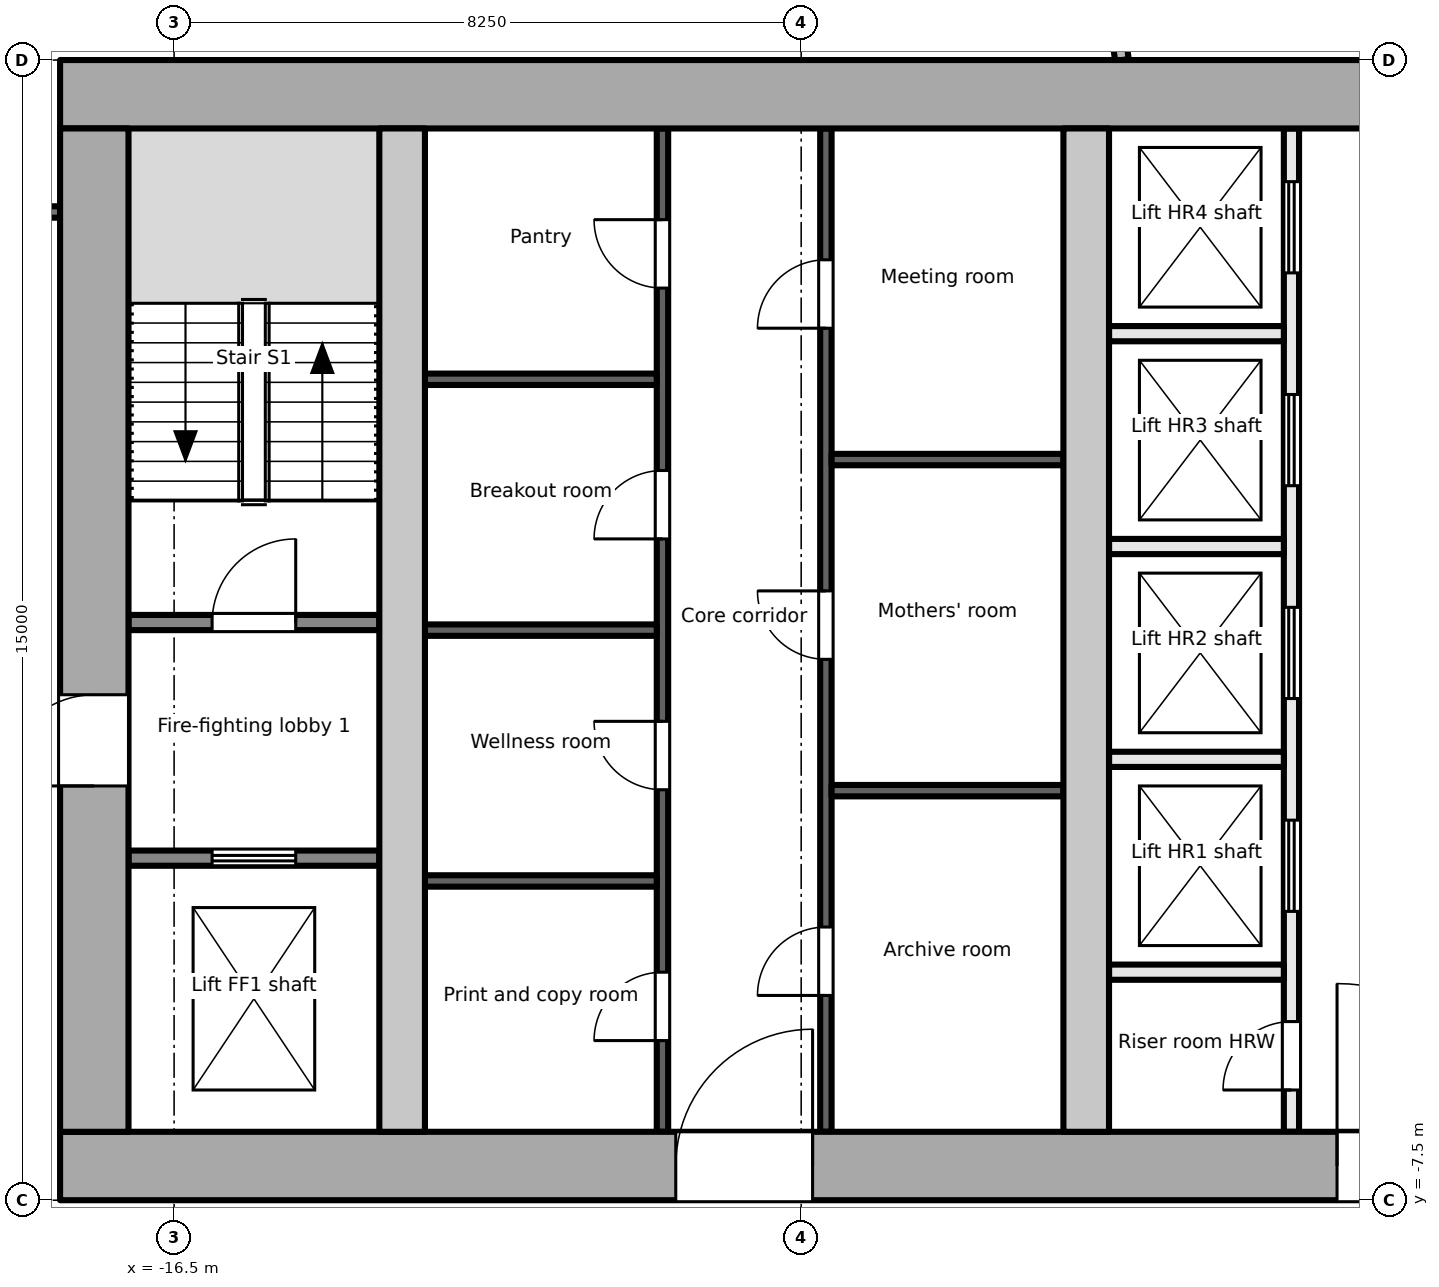
"""IFC4 building model, lengths in metres.
Left out: names, types, materials, properties, quantities, classifications, styles, units other than length and angle.
Written with IfcOpenShell. Run it as: python <this file> out.ifc"""

import sys

from ifc_helpers import new_model, si_unit, direction, frame, frame_2d, origin, place, context, subcontext, project, spatial, rectangle, extrude, element, fill, save


model = new_model("IFC4")
c1 = context("Model", 3, precision=1e-05, world=origin(), true_north=direction((0.0, 1.0)))
c2 = subcontext(c1, "Body", "Model", "MODEL_VIEW")
j1 = project(units=[si_unit("LENGTHUNIT", "METRE"), si_unit("PLANEANGLEUNIT", "RADIAN")], contexts=[c1])
p1 = place(None, origin())
s1 = spatial("IfcSite", under=j1, at=p1, CompositionType="ELEMENT")
p2 = place(p1, origin())
s2 = spatial("IfcBuilding", under=s1, at=p2, CompositionType="ELEMENT")
p3 = place(p2, frame((0.0, 0.0, 176.3)))
s3 = spatial("IfcBuildingStorey", under=s2, at=p3, CompositionType="ELEMENT", Elevation=176.3)
p4 = place(p3, frame((-18.0, -7.05, -0.2), z_axis=(0.0, 0.0, 1.0), x_axis=(1.0, 0.0, 0.0)))
e1 = element("IfcWall", 1, at=p4, inside=s3, PredefinedType="SHEAR", context=c2, shape_type="SweptSolid", body=[
    extrude(rectangle(XDim=36.0, YDim=0.9, at=frame_2d((18.0, 0.0))), origin(), (0.0, 0.0, 1.0), 3.9),
])
p5 = place(p4, frame((8.1, 0.0, 0.2)))
e2 = element("IfcOpeningElement", 2, at=p5, cuts=e1, PredefinedType="OPENING", context=c2, shape_type="SweptSolid", body=[
    extrude(rectangle(XDim=1.8, YDim=2.1, at=frame_2d((0.9, 1.05))), frame((0.0, 0.46, 0.0), z_axis=(0.0, -1.0, 0.0), x_axis=(1.0, 0.0, 0.0)), (0.0, 0.0, 1.0), 0.921),
])
p6 = place(p4, frame((16.8, 0.0, 0.2)))
e3 = element("IfcOpeningElement", 3, at=p6, cuts=e1, PredefinedType="OPENING", context=c2, shape_type="SweptSolid", body=[
    extrude(rectangle(XDim=2.4, YDim=2.1, at=frame_2d((1.2, 1.05))), frame((0.0, 0.46, 0.0), z_axis=(0.0, -1.0, 0.0), x_axis=(1.0, 0.0, 0.0)), (0.0, 0.0, 1.0), 0.921),
])
p7 = place(p4, frame((26.1, 0.0, 0.2)))
e4 = element("IfcOpeningElement", 4, at=p7, cuts=e1, PredefinedType="OPENING", context=c2, shape_type="SweptSolid", body=[
    extrude(rectangle(XDim=2.4, YDim=2.1, at=frame_2d((1.2, 1.05))), frame((0.0, 0.46, 0.0), z_axis=(0.0, -1.0, 0.0), x_axis=(1.0, 0.0, 0.0)), (0.0, 0.0, 1.0), 0.921),
])
p8 = place(p3, frame((-18.0, 7.05, -0.2), z_axis=(0.0, 0.0, 1.0), x_axis=(1.0, 0.0, 0.0)))
e5 = element("IfcWall", 5, at=p8, inside=s3, PredefinedType="SHEAR", context=c2, shape_type="SweptSolid", body=[
    extrude(rectangle(XDim=36.0, YDim=0.9, at=frame_2d((18.0, 0.0))), origin(), (0.0, 0.0, 1.0), 3.9),
])
p9 = place(p3, frame((-17.55, -6.6, -0.2), z_axis=(0.0, 0.0, 1.0), x_axis=(0.0, 1.0, 0.0)))
e6 = element("IfcWall", 6, at=p9, inside=s3, PredefinedType="SHEAR", context=c2, shape_type="SweptSolid", body=[
    extrude(rectangle(XDim=13.2, YDim=0.9, at=frame_2d((6.6, 0.0))), origin(), (0.0, 0.0, 1.0), 3.9),
])
p10 = place(p9, frame((4.55, 0.0, 0.2)))
e7 = element("IfcOpeningElement", 7, at=p10, cuts=e6, PredefinedType="OPENING", context=c2, shape_type="SweptSolid", body=[
    extrude(rectangle(XDim=1.2, YDim=2.1, at=frame_2d((0.6, 1.05))), frame((0.0, 0.46, 0.0), z_axis=(0.0, -1.0, 0.0), x_axis=(1.0, 0.0, 0.0)), (0.0, 0.0, 1.0), 0.921),
])
for number, where, z_axis, x_axis in (
    (8, (-13.5, -6.6, -0.2), (0.0, 0.0, 1.0), (0.0, 1.0, 0.0)),
    (9, (-4.5, -6.6, -0.2), (0.0, 0.0, 1.0), (0.0, 1.0, 0.0)),
):
    element("IfcWall", number, at=place(p3, frame(where, z_axis=z_axis, x_axis=x_axis)), inside=s3, PredefinedType="SHEAR", context=c2, shape_type="SweptSolid", body=[
        extrude(rectangle(XDim=13.2, YDim=0.6, at=frame_2d((6.6, 0.0))), origin(), (0.0, 0.0, 1.0), 3.9),
    ])
p11 = place(p3, frame((-17.1, -3.0, 0.0), z_axis=(0.0, 0.0, 1.0), x_axis=(1.0, 0.0, 0.0)))
e10 = element("IfcWall", 10, at=p11, inside=s3, PredefinedType="PARTITIONING", context=c2, shape_type="SweptSolid", body=[
    extrude(rectangle(XDim=3.3, YDim=0.2, at=frame_2d((1.65, 0.0))), origin(), (0.0, 0.0, 1.0), 3.7),
])
p12 = place(p11, frame((1.1, 0.0, 0.0)))
e11 = element("IfcOpeningElement", 11, at=p12, cuts=e10, PredefinedType="OPENING", context=c2, shape_type="SweptSolid", body=[
    extrude(rectangle(XDim=1.1, YDim=2.1, at=frame_2d((0.55, 1.05))), frame((0.0, 0.111, 0.0), z_axis=(0.0, -1.0, 0.0), x_axis=(1.0, 0.0, 0.0)), (0.0, 0.0, 1.0), 0.221),
])
p13 = place(p3, frame((-17.1, 0.1, 0.0), z_axis=(0.0, 0.0, 1.0), x_axis=(1.0, 0.0, 0.0)))
e12 = element("IfcWall", 12, at=p13, inside=s3, PredefinedType="PARTITIONING", context=c2, shape_type="SweptSolid", body=[
    extrude(rectangle(XDim=3.3, YDim=0.2, at=frame_2d((1.65, 0.0))), origin(), (0.0, 0.0, 1.0), 3.7),
])
p14 = place(p13, frame((1.1, 0.0, 0.0)))
e13 = element("IfcOpeningElement", 13, at=p14, cuts=e12, PredefinedType="OPENING", context=c2, shape_type="SweptSolid", body=[
    extrude(rectangle(XDim=1.1, YDim=2.1, at=frame_2d((0.55, 1.05))), frame((0.0, 0.111, 0.0), z_axis=(0.0, -1.0, 0.0), x_axis=(1.0, 0.0, 0.0)), (0.0, 0.0, 1.0), 0.221),
])
p15 = place(p3, frame((-10.075, -6.6, 0.0), z_axis=(0.0, 0.0, 1.0), x_axis=(0.0, 1.0, 0.0)))
e14 = element("IfcWall", 14, at=p15, inside=s3, PredefinedType="PARTITIONING", context=c2, shape_type="SweptSolid", body=[
    extrude(rectangle(XDim=13.2, YDim=0.15, at=frame_2d((6.6, 0.0))), origin(), (0.0, 0.0, 1.0), 3.7),
])
p16 = place(p15, frame((1.2, 0.0, 0.0)))
e15 = element("IfcOpeningElement", 15, at=p16, cuts=e14, PredefinedType="OPENING", context=c2, shape_type="SweptSolid", body=[
    extrude(rectangle(XDim=0.9, YDim=2.1, at=frame_2d((0.45, 1.05))), frame((0.0, 0.085, 0.0), z_axis=(0.0, -1.0, 0.0), x_axis=(1.0, 0.0, 0.0)), (0.0, 0.0, 1.0), 0.171),
])
p17 = place(p15, frame((4.5, 0.0, 0.0)))
e16 = element("IfcOpeningElement", 16, at=p17, cuts=e14, PredefinedType="OPENING", context=c2, shape_type="SweptSolid", body=[
    extrude(rectangle(XDim=0.9, YDim=2.1, at=frame_2d((0.45, 1.05))), frame((0.0, 0.085, 0.0), z_axis=(0.0, -1.0, 0.0), x_axis=(1.0, 0.0, 0.0)), (0.0, 0.0, 1.0), 0.171),
])
p18 = place(p15, frame((7.8, 0.0, 0.0)))
e17 = element("IfcOpeningElement", 17, at=p18, cuts=e14, PredefinedType="OPENING", context=c2, shape_type="SweptSolid", body=[
    extrude(rectangle(XDim=0.9, YDim=2.1, at=frame_2d((0.45, 1.05))), frame((0.0, 0.085, 0.0), z_axis=(0.0, -1.0, 0.0), x_axis=(1.0, 0.0, 0.0)), (0.0, 0.0, 1.0), 0.171),
])
p19 = place(p15, frame((11.1, 0.0, 0.0)))
e18 = element("IfcOpeningElement", 18, at=p19, cuts=e14, PredefinedType="OPENING", context=c2, shape_type="SweptSolid", body=[
    extrude(rectangle(XDim=0.9, YDim=2.1, at=frame_2d((0.45, 1.05))), frame((0.0, 0.085, 0.0), z_axis=(0.0, -1.0, 0.0), x_axis=(1.0, 0.0, 0.0)), (0.0, 0.0, 1.0), 0.171),
])
for number, where, z_axis, x_axis in (
    (19, (-13.2, -3.3, 0.0), (0.0, 0.0, 1.0), (1.0, 0.0, 0.0)),
    (20, (-13.2, 0.0, 0.0), (0.0, 0.0, 1.0), (1.0, 0.0, 0.0)),
    (21, (-13.2, 3.3, 0.0), (0.0, 0.0, 1.0), (1.0, 0.0, 0.0)),
):
    element("IfcWall", number, at=place(p3, frame(where, z_axis=z_axis, x_axis=x_axis)), inside=s3, PredefinedType="PARTITIONING", context=c2, shape_type="SweptSolid", body=[
        extrude(rectangle(XDim=3.05, YDim=0.15, at=frame_2d((1.525, 0.0))), origin(), (0.0, 0.0, 1.0), 3.7),
    ])
p20 = place(p3, frame((-7.925, -6.6, 0.0), z_axis=(0.0, 0.0, 1.0), x_axis=(0.0, 1.0, 0.0)))
e22 = element("IfcWall", 22, at=p20, inside=s3, PredefinedType="PARTITIONING", context=c2, shape_type="SweptSolid", body=[
    extrude(rectangle(XDim=13.2, YDim=0.15, at=frame_2d((6.6, 0.0))), origin(), (0.0, 0.0, 1.0), 3.7),
])
p21 = place(p20, frame((1.794, 0.0, 0.0)))
e23 = element("IfcOpeningElement", 23, at=p21, cuts=e22, PredefinedType="OPENING", context=c2, shape_type="SweptSolid", body=[
    extrude(rectangle(XDim=0.9, YDim=2.1, at=frame_2d((0.45, 1.05))), frame((0.0, 0.085, 0.0), z_axis=(0.0, -1.0, 0.0), x_axis=(1.0, 0.0, 0.0)), (0.0, 0.0, 1.0), 0.171),
])
p22 = place(p20, frame((6.216, 0.0, 0.0)))
e24 = element("IfcOpeningElement", 24, at=p22, cuts=e22, PredefinedType="OPENING", context=c2, shape_type="SweptSolid", body=[
    extrude(rectangle(XDim=0.9, YDim=2.1, at=frame_2d((0.45, 1.05))), frame((0.0, 0.085, 0.0), z_axis=(0.0, -1.0, 0.0), x_axis=(1.0, 0.0, 0.0)), (0.0, 0.0, 1.0), 0.171),
])
p23 = place(p20, frame((10.572, 0.0, 0.0)))
e25 = element("IfcOpeningElement", 25, at=p23, cuts=e22, PredefinedType="OPENING", context=c2, shape_type="SweptSolid", body=[
    extrude(rectangle(XDim=0.9, YDim=2.1, at=frame_2d((0.45, 1.05))), frame((0.0, 0.085, 0.0), z_axis=(0.0, -1.0, 0.0), x_axis=(1.0, 0.0, 0.0)), (0.0, 0.0, 1.0), 0.171),
])
for number, where, z_axis, x_axis in (
    (26, (-7.85, -2.112, 0.0), (0.0, 0.0, 1.0), (1.0, 0.0, 0.0)),
    (27, (-7.85, 2.244, 0.0), (0.0, 0.0, 1.0), (1.0, 0.0, 0.0)),
):
    element("IfcWall", number, at=place(p3, frame(where, z_axis=z_axis, x_axis=x_axis)), inside=s3, PredefinedType="PARTITIONING", context=c2, shape_type="SweptSolid", body=[
        extrude(rectangle(XDim=3.05, YDim=0.15, at=frame_2d((1.525, 0.0))), origin(), (0.0, 0.0, 1.0), 3.7),
    ])
p24 = place(p3, frame((-1.8, -6.6, 0.0), z_axis=(0.0, 0.0, 1.0), x_axis=(0.0, 1.0, 0.0)))
e28 = element("IfcWall", 28, at=p24, inside=s3, PredefinedType="PARTITIONING", context=c2, shape_type="SweptSolid", body=[
    extrude(rectangle(XDim=13.2, YDim=0.2, at=frame_2d((6.6, 0.0))), origin(), (0.0, 0.0, 1.0), 3.7),
])
p25 = place(p24, frame((0.55, 0.0, 0.0)))
e29 = element("IfcOpeningElement", 29, at=p25, cuts=e28, PredefinedType="OPENING", context=c2, shape_type="SweptSolid", body=[
    extrude(rectangle(XDim=0.9, YDim=2.1, at=frame_2d((0.45, 1.05))), frame((0.0, 0.111, 0.0), z_axis=(0.0, -1.0, 0.0), x_axis=(1.0, 0.0, 0.0)), (0.0, 0.0, 1.0), 0.221),
])
p26 = place(p24, frame((2.9, 0.0, 0.0)))
e30 = element("IfcOpeningElement", 30, at=p26, cuts=e28, PredefinedType="OPENING", context=c2, shape_type="SweptSolid", body=[
    extrude(rectangle(XDim=1.2, YDim=2.1, at=frame_2d((0.6, 1.05))), frame((0.0, 0.111, 0.0), z_axis=(0.0, -1.0, 0.0), x_axis=(1.0, 0.0, 0.0)), (0.0, 0.0, 1.0), 0.221),
])
p27 = place(p24, frame((5.7, 0.0, 0.0)))
e31 = element("IfcOpeningElement", 31, at=p27, cuts=e28, PredefinedType="OPENING", context=c2, shape_type="SweptSolid", body=[
    extrude(rectangle(XDim=1.2, YDim=2.1, at=frame_2d((0.6, 1.05))), frame((0.0, 0.111, 0.0), z_axis=(0.0, -1.0, 0.0), x_axis=(1.0, 0.0, 0.0)), (0.0, 0.0, 1.0), 0.221),
])
p28 = place(p24, frame((8.5, 0.0, 0.0)))
e32 = element("IfcOpeningElement", 32, at=p28, cuts=e28, PredefinedType="OPENING", context=c2, shape_type="SweptSolid", body=[
    extrude(rectangle(XDim=1.2, YDim=2.1, at=frame_2d((0.6, 1.05))), frame((0.0, 0.111, 0.0), z_axis=(0.0, -1.0, 0.0), x_axis=(1.0, 0.0, 0.0)), (0.0, 0.0, 1.0), 0.221),
])
p29 = place(p24, frame((11.3, 0.0, 0.0)))
e33 = element("IfcOpeningElement", 33, at=p29, cuts=e28, PredefinedType="OPENING", context=c2, shape_type="SweptSolid", body=[
    extrude(rectangle(XDim=1.2, YDim=2.1, at=frame_2d((0.6, 1.05))), frame((0.0, 0.111, 0.0), z_axis=(0.0, -1.0, 0.0), x_axis=(1.0, 0.0, 0.0)), (0.0, 0.0, 1.0), 0.221),
])
for number, where, z_axis, x_axis in (
    (34, (-4.2, -1.7, 0.0), (0.0, 0.0, 1.0), (1.0, 0.0, 0.0)),
    (35, (-4.2, 1.1, 0.0), (0.0, 0.0, 1.0), (1.0, 0.0, 0.0)),
    (36, (-4.2, 3.9, 0.0), (0.0, 0.0, 1.0), (1.0, 0.0, 0.0)),
    (37, (-4.2, -4.5, 0.0), (0.0, 0.0, 1.0), (1.0, 0.0, 0.0)),
):
    element("IfcWall", number, at=place(p3, frame(where, z_axis=z_axis, x_axis=x_axis)), inside=s3, PredefinedType="PARTITIONING", context=c2, shape_type="SweptSolid", body=[
        extrude(rectangle(XDim=2.3, YDim=0.2, at=frame_2d((1.15, 0.0))), origin(), (0.0, 0.0, 1.0), 3.7),
    ])
p30 = place(p3, frame((-20.325, 5.501, 0.0), z_axis=(0.0, 0.0, 1.0), x_axis=(1.0, 0.0, 0.0)))
e38 = element("IfcWall", 38, at=p30, inside=s3, PredefinedType="PARTITIONING", context=c2, shape_type="SweptSolid", body=[
    extrude(rectangle(XDim=2.325, YDim=0.15, at=frame_2d((1.163, 0.0))), origin(), (0.0, 0.0, 1.0), 3.7),
])
p31 = place(p3, frame((-4.437, 10.393, 0.0), z_axis=(0.0, 0.0, 1.0), x_axis=(0.139303486007, -0.990249735565, 0.0)))
e39 = element("IfcWall", 39, at=p31, inside=s3, PredefinedType="PARTITIONING", context=c2, shape_type="SweptSolid", body=[
    extrude(rectangle(XDim=2.922, YDim=0.18, at=frame_2d((1.461, 0.0))), origin(), (0.0, 0.0, 1.0), 3.25),
])
p32 = place(p12, origin())
e40 = element("IfcDoor", 40, at=p32, inside=s3, OperationType="DOUBLE_DOOR_SLIDING", PredefinedType="DOOR", context=c2, shape_type="SweptSolid", body=[
    extrude(rectangle(XDim=1.1, YDim=2.1, at=frame_2d((0.55, 1.05))), frame((0.0, 0.025, 0.0), z_axis=(0.0, -1.0, 0.0), x_axis=(1.0, 0.0, 0.0)), (0.0, 0.0, 1.0), 0.05),
])
fill(e11, e40)
p33 = place(p10, origin())
e41 = element("IfcDoor", 41, at=p33, inside=s3, OperationType="SINGLE_SWING_LEFT", PredefinedType="DOOR", context=c2, shape_type="SweptSolid", body=[
    extrude(rectangle(XDim=1.2, YDim=2.1, at=frame_2d((0.6, 1.05))), frame((0.0, 0.025, 0.0), z_axis=(0.0, -1.0, 0.0), x_axis=(1.0, 0.0, 0.0)), (0.0, 0.0, 1.0), 0.05),
])
fill(e7, e41)
p34 = place(p14, origin())
e42 = element("IfcDoor", 42, at=p34, inside=s3, OperationType="SINGLE_SWING_RIGHT", PredefinedType="DOOR", context=c2, shape_type="SweptSolid", body=[
    extrude(rectangle(XDim=1.1, YDim=2.1, at=frame_2d((0.55, 1.05))), frame((0.0, 0.025, 0.0), z_axis=(0.0, -1.0, 0.0), x_axis=(1.0, 0.0, 0.0)), (0.0, 0.0, 1.0), 0.05),
])
fill(e13, e42)
p35 = place(p16, origin())
e43 = element("IfcDoor", 43, at=p35, inside=s3, OperationType="SINGLE_SWING_LEFT", PredefinedType="DOOR", context=c2, shape_type="SweptSolid", body=[
    extrude(rectangle(XDim=0.9, YDim=2.1, at=frame_2d((0.45, 1.05))), frame((0.0, 0.025, 0.0), z_axis=(0.0, -1.0, 0.0), x_axis=(1.0, 0.0, 0.0)), (0.0, 0.0, 1.0), 0.05),
])
fill(e15, e43)
p36 = place(p17, origin())
e44 = element("IfcDoor", 44, at=p36, inside=s3, OperationType="SINGLE_SWING_RIGHT", PredefinedType="DOOR", context=c2, shape_type="SweptSolid", body=[
    extrude(rectangle(XDim=0.9, YDim=2.1, at=frame_2d((0.45, 1.05))), frame((0.0, 0.025, 0.0), z_axis=(0.0, -1.0, 0.0), x_axis=(1.0, 0.0, 0.0)), (0.0, 0.0, 1.0), 0.05),
])
fill(e16, e44)
p37 = place(p18, origin())
e45 = element("IfcDoor", 45, at=p37, inside=s3, OperationType="SINGLE_SWING_LEFT", PredefinedType="DOOR", context=c2, shape_type="SweptSolid", body=[
    extrude(rectangle(XDim=0.9, YDim=2.1, at=frame_2d((0.45, 1.05))), frame((0.0, 0.025, 0.0), z_axis=(0.0, -1.0, 0.0), x_axis=(1.0, 0.0, 0.0)), (0.0, 0.0, 1.0), 0.05),
])
fill(e17, e45)
p38 = place(p19, origin())
e46 = element("IfcDoor", 46, at=p38, inside=s3, OperationType="SINGLE_SWING_RIGHT", PredefinedType="DOOR", context=c2, shape_type="SweptSolid", body=[
    extrude(rectangle(XDim=0.9, YDim=2.1, at=frame_2d((0.45, 1.05))), frame((0.0, 0.025, 0.0), z_axis=(0.0, -1.0, 0.0), x_axis=(1.0, 0.0, 0.0)), (0.0, 0.0, 1.0), 0.05),
])
fill(e18, e46)
p39 = place(p21, origin())
e47 = element("IfcDoor", 47, at=p39, inside=s3, OperationType="SINGLE_SWING_LEFT", PredefinedType="DOOR", context=c2, shape_type="SweptSolid", body=[
    extrude(rectangle(XDim=0.9, YDim=2.1, at=frame_2d((0.45, 1.05))), frame((0.0, 0.025, 0.0), z_axis=(0.0, -1.0, 0.0), x_axis=(1.0, 0.0, 0.0)), (0.0, 0.0, 1.0), 0.05),
])
fill(e23, e47)
p40 = place(p22, origin())
e48 = element("IfcDoor", 48, at=p40, inside=s3, OperationType="SINGLE_SWING_RIGHT", PredefinedType="DOOR", context=c2, shape_type="SweptSolid", body=[
    extrude(rectangle(XDim=0.9, YDim=2.1, at=frame_2d((0.45, 1.05))), frame((0.0, 0.025, 0.0), z_axis=(0.0, -1.0, 0.0), x_axis=(1.0, 0.0, 0.0)), (0.0, 0.0, 1.0), 0.05),
])
fill(e24, e48)
p41 = place(p23, origin())
e49 = element("IfcDoor", 49, at=p41, inside=s3, OperationType="SINGLE_SWING_LEFT", PredefinedType="DOOR", context=c2, shape_type="SweptSolid", body=[
    extrude(rectangle(XDim=0.9, YDim=2.1, at=frame_2d((0.45, 1.05))), frame((0.0, 0.025, 0.0), z_axis=(0.0, -1.0, 0.0), x_axis=(1.0, 0.0, 0.0)), (0.0, 0.0, 1.0), 0.05),
])
fill(e25, e49)
p42 = place(p5, origin())
e50 = element("IfcDoor", 50, at=p42, inside=s3, OperationType="SINGLE_SWING_RIGHT", PredefinedType="DOOR", context=c2, shape_type="SweptSolid", body=[
    extrude(rectangle(XDim=1.8, YDim=2.1, at=frame_2d((0.9, 1.05))), frame((0.0, 0.025, 0.0), z_axis=(0.0, -1.0, 0.0), x_axis=(1.0, 0.0, 0.0)), (0.0, 0.0, 1.0), 0.05),
])
fill(e2, e50)
p43 = place(p25, origin())
e51 = element("IfcDoor", 51, at=p43, inside=s3, OperationType="SINGLE_SWING_LEFT", PredefinedType="DOOR", context=c2, shape_type="SweptSolid", body=[
    extrude(rectangle(XDim=0.9, YDim=2.1, at=frame_2d((0.45, 1.05))), frame((0.0, 0.025, 0.0), z_axis=(0.0, -1.0, 0.0), x_axis=(1.0, 0.0, 0.0)), (0.0, 0.0, 1.0), 0.05),
])
fill(e29, e51)
p44 = place(p26, origin())
e52 = element("IfcDoor", 52, at=p44, inside=s3, OperationType="DOUBLE_DOOR_SLIDING", PredefinedType="DOOR", context=c2, shape_type="SweptSolid", body=[
    extrude(rectangle(XDim=1.2, YDim=2.1, at=frame_2d((0.6, 1.05))), frame((0.0, 0.025, 0.0), z_axis=(0.0, -1.0, 0.0), x_axis=(1.0, 0.0, 0.0)), (0.0, 0.0, 1.0), 0.05),
])
fill(e30, e52)
p45 = place(p27, origin())
e53 = element("IfcDoor", 53, at=p45, inside=s3, OperationType="DOUBLE_DOOR_SLIDING", PredefinedType="DOOR", context=c2, shape_type="SweptSolid", body=[
    extrude(rectangle(XDim=1.2, YDim=2.1, at=frame_2d((0.6, 1.05))), frame((0.0, 0.025, 0.0), z_axis=(0.0, -1.0, 0.0), x_axis=(1.0, 0.0, 0.0)), (0.0, 0.0, 1.0), 0.05),
])
fill(e31, e53)
p46 = place(p28, origin())
e54 = element("IfcDoor", 54, at=p46, inside=s3, OperationType="DOUBLE_DOOR_SLIDING", PredefinedType="DOOR", context=c2, shape_type="SweptSolid", body=[
    extrude(rectangle(XDim=1.2, YDim=2.1, at=frame_2d((0.6, 1.05))), frame((0.0, 0.025, 0.0), z_axis=(0.0, -1.0, 0.0), x_axis=(1.0, 0.0, 0.0)), (0.0, 0.0, 1.0), 0.05),
])
fill(e32, e54)
p47 = place(p29, origin())
e55 = element("IfcDoor", 55, at=p47, inside=s3, OperationType="DOUBLE_DOOR_SLIDING", PredefinedType="DOOR", context=c2, shape_type="SweptSolid", body=[
    extrude(rectangle(XDim=1.2, YDim=2.1, at=frame_2d((0.6, 1.05))), frame((0.0, 0.025, 0.0), z_axis=(0.0, -1.0, 0.0), x_axis=(1.0, 0.0, 0.0)), (0.0, 0.0, 1.0), 0.05),
])
fill(e33, e55)
p48 = place(p6, origin())
e56 = element("IfcDoor", 56, at=p48, inside=s3, OperationType="DOUBLE_DOOR_DOUBLE_SWING", PredefinedType="DOOR", context=c2, shape_type="SweptSolid", body=[
    extrude(rectangle(XDim=2.4, YDim=2.1, at=frame_2d((1.2, 1.05))), frame((0.0, 0.025, 0.0), z_axis=(0.0, -1.0, 0.0), x_axis=(1.0, 0.0, 0.0)), (0.0, 0.0, 1.0), 0.05),
])
fill(e3, e56)
save(model, sys.argv[1])
